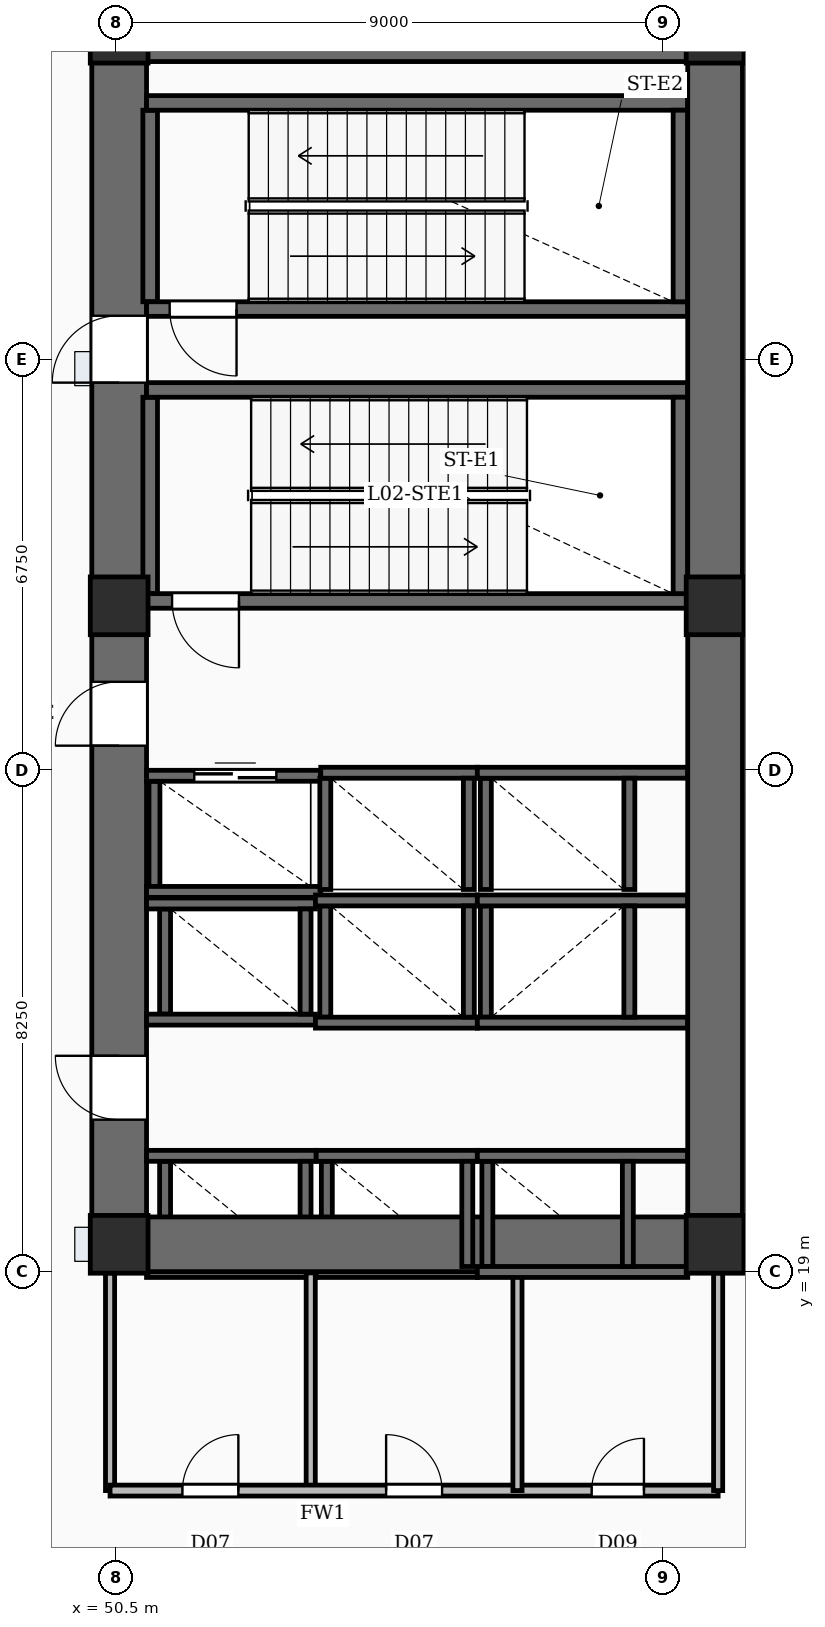
"""IFC4 building model, lengths in metres.
Left out: names, types, materials, properties, quantities, classifications, styles, units other than length and angle.
Written with IfcOpenShell. Run it as: python <this file> out.ifc"""

import sys

from ifc_helpers import new_model, si_unit, direction, frame, frame_2d, origin, origin_2d, place, context, subcontext, project, spatial, rectangle, extrude, element, fill, save


model = new_model("IFC4")
c1 = context("Model", 3, precision=1e-05, world=origin(), true_north=direction((0.0, 1.0)))
c2 = subcontext(c1, "Body", "Model", "MODEL_VIEW")
j1 = project(units=[si_unit("LENGTHUNIT", "METRE"), si_unit("PLANEANGLEUNIT", "RADIAN")], contexts=[c1])
p1 = place(None, origin())
s1 = spatial("IfcSite", under=j1, at=p1, CompositionType="ELEMENT")
p2 = place(p1, origin())
s2 = spatial("IfcBuilding", under=s1, at=p2, CompositionType="ELEMENT")
p3 = place(p2, frame((0.0, 0.0, 13.0)))
s3 = spatial("IfcBuildingStorey", under=s2, at=p3, CompositionType="ELEMENT", Elevation=13.0)
p4 = place(p3, frame((50.55, 19.0, -0.35), z_axis=(0.0, 0.0, 1.0), x_axis=(0.0, 1.0, 0.0)))
e1 = element("IfcWall", 1, at=p4, inside=s3, PredefinedType="SHEAR", context=c2, shape_type="SweptSolid", body=[
    extrude(rectangle(XDim=20.8, YDim=0.9, at=frame_2d((10.4, 0.0))), origin(), (0.0, 0.0, 1.0), 5.0),
])
p5 = place(p4, frame((2.5, 0.0, 0.35)))
e2 = element("IfcOpeningElement", 2, at=p5, cuts=e1, PredefinedType="OPENING", context=c2, shape_type="SweptSolid", body=[
    extrude(rectangle(XDim=1.05, YDim=2.15, at=frame_2d((0.525, 1.075))), frame((0.0, 0.46, 0.0), z_axis=(0.0, -1.0, 0.0), x_axis=(1.0, 0.0, 0.0)), (0.0, 0.0, 1.0), 0.92),
])
p6 = place(p4, frame((8.65, 0.0, 0.35)))
e3 = element("IfcOpeningElement", 3, at=p6, cuts=e1, PredefinedType="OPENING", context=c2, shape_type="SweptSolid", body=[
    extrude(rectangle(XDim=1.05, YDim=2.15, at=frame_2d((0.525, 1.075))), frame((0.0, 0.46, 0.0), z_axis=(0.0, -1.0, 0.0), x_axis=(1.0, 0.0, 0.0)), (0.0, 0.0, 1.0), 0.92),
])
p7 = place(p4, frame((14.62, 0.0, 0.35)))
e4 = element("IfcOpeningElement", 4, at=p7, cuts=e1, PredefinedType="OPENING", context=c2, shape_type="SweptSolid", body=[
    extrude(rectangle(XDim=1.1, YDim=2.15, at=frame_2d((0.55, 1.075))), frame((0.0, 0.46, 0.0), z_axis=(0.0, -1.0, 0.0), x_axis=(1.0, 0.0, 0.0)), (0.0, 0.0, 1.0), 0.92),
])
p8 = place(p3, frame((60.35, 19.0, -0.35), z_axis=(0.0, 0.0, 1.0), x_axis=(0.0, 1.0, 0.0)))
e5 = element("IfcWall", 5, at=p8, inside=s3, PredefinedType="SHEAR", context=c2, shape_type="SweptSolid", body=[
    extrude(rectangle(XDim=20.8, YDim=0.9, at=frame_2d((10.4, 0.0))), origin(), (0.0, 0.0, 1.0), 5.0),
])
for number, where, z_axis, x_axis in (
    (6, (51.0, 19.45, -0.35), (0.0, 0.0, 1.0), (1.0, 0.0, 0.0)),
    (7, (51.0, 39.35, -0.35), (0.0, 0.0, 1.0), (1.0, 0.0, 0.0)),
):
    element("IfcWall", number, at=place(p3, frame(where, z_axis=z_axis, x_axis=x_axis)), inside=s3, PredefinedType="SHEAR", context=c2, shape_type="SweptSolid", body=[
        extrude(rectangle(XDim=8.9, YDim=0.9, at=frame_2d((4.45, 0.0))), origin(), (0.0, 0.0, 1.0), 5.0),
    ])
for number, where, z_axis, x_axis in (
    (8, (50.55, 19.45, -0.35), (0.0, 0.0, 1.0), (1.0, 0.0, 0.0)),
    (9, (60.35, 19.45, -0.35), (0.0, 0.0, 1.0), (1.0, 0.0, 0.0)),
    (10, (50.55, 29.95, -0.35), (0.0, 0.0, 1.0), (1.0, 0.0, 0.0)),
    (11, (60.35, 29.95, -0.35), (0.0, 0.0, 1.0), (1.0, 0.0, 0.0)),
    (12, (50.55, 39.35, -0.35), (0.0, 0.0, 1.0), (1.0, 0.0, 0.0)),
    (13, (60.35, 39.35, -0.35), (0.0, 0.0, 1.0), (1.0, 0.0, 0.0)),
):
    element("IfcColumn", number, at=place(p3, frame(where, z_axis=z_axis, x_axis=x_axis)), inside=s3, PredefinedType="COLUMN", context=c2, shape_type="SweptSolid", body=[
        extrude(rectangle(XDim=0.95, YDim=0.95, at=origin_2d()), origin(), (0.0, 0.0, 1.0), 5.0),
    ])
p9 = place(p3, frame((59.9, 30.03, 0.0), z_axis=(0.0, 0.0, 1.0), x_axis=(-1.0, 0.0, 0.0)))
e14 = element("IfcWall", 14, at=p9, inside=s3, PredefinedType="SOLIDWALL", context=c2, shape_type="SweptSolid", body=[
    extrude(rectangle(XDim=8.9, YDim=0.24, at=frame_2d((4.45, 0.0))), origin(), (0.0, 0.0, 1.0), 4.65),
])
p10 = place(p9, frame((7.38, 0.0, 0.0)))
e15 = element("IfcOpeningElement", 15, at=p10, cuts=e14, PredefinedType="OPENING", context=c2, shape_type="SweptSolid", body=[
    extrude(rectangle(XDim=1.1, YDim=2.15, at=frame_2d((0.55, 1.075))), frame((0.0, 0.13, 0.0), z_axis=(0.0, -1.0, 0.0), x_axis=(1.0, 0.0, 0.0)), (0.0, 0.0, 1.0), 0.26),
])
p11 = place(p3, frame((51.0, 33.5, 0.0), z_axis=(0.0, 0.0, 1.0), x_axis=(1.0, 0.0, 0.0)))
e16 = element("IfcWall", 16, at=p11, inside=s3, PredefinedType="SOLIDWALL", context=c2, shape_type="SweptSolid", body=[
    extrude(rectangle(XDim=8.9, YDim=0.24, at=frame_2d((4.45, 0.0))), origin(), (0.0, 0.0, 1.0), 4.65),
])
for number, where, z_axis, x_axis in (
    (17, (51.06, 30.15, 0.0), (0.0, 0.0, 1.0), (0.0, 1.0, 0.0)),
    (18, (59.78, 30.15, 0.0), (0.0, 0.0, 1.0), (0.0, 1.0, 0.0)),
):
    element("IfcWall", number, at=place(p3, frame(where, z_axis=z_axis, x_axis=x_axis)), inside=s3, PredefinedType="SOLIDWALL", context=c2, shape_type="SweptSolid", body=[
        extrude(rectangle(XDim=3.23, YDim=0.24, at=frame_2d((1.615, 0.0))), origin(), (0.0, 0.0, 1.0), 4.65),
    ])
p12 = place(p3, frame((59.9, 34.83, 0.0), z_axis=(0.0, 0.0, 1.0), x_axis=(-1.0, 0.0, 0.0)))
e19 = element("IfcWall", 19, at=p12, inside=s3, PredefinedType="SOLIDWALL", context=c2, shape_type="SweptSolid", body=[
    extrude(rectangle(XDim=8.9, YDim=0.24, at=frame_2d((4.45, 0.0))), origin(), (0.0, 0.0, 1.0), 4.65),
])
p13 = place(p12, frame((7.42, 0.0, 0.0)))
e20 = element("IfcOpeningElement", 20, at=p13, cuts=e19, PredefinedType="OPENING", context=c2, shape_type="SweptSolid", body=[
    extrude(rectangle(XDim=1.1, YDim=2.15, at=frame_2d((0.55, 1.075))), frame((0.0, 0.13, 0.0), z_axis=(0.0, -1.0, 0.0), x_axis=(1.0, 0.0, 0.0)), (0.0, 0.0, 1.0), 0.26),
])
p14 = place(p3, frame((51.0, 38.22, 0.0), z_axis=(0.0, 0.0, 1.0), x_axis=(1.0, 0.0, 0.0)))
e21 = element("IfcWall", 21, at=p14, inside=s3, PredefinedType="SOLIDWALL", context=c2, shape_type="SweptSolid", body=[
    extrude(rectangle(XDim=8.9, YDim=0.24, at=frame_2d((4.45, 0.0))), origin(), (0.0, 0.0, 1.0), 4.65),
])
for number, where, z_axis, x_axis in (
    (22, (51.06, 34.95, 0.0), (0.0, 0.0, 1.0), (0.0, 1.0, 0.0)),
    (23, (59.78, 34.95, 0.0), (0.0, 0.0, 1.0), (0.0, 1.0, 0.0)),
):
    element("IfcWall", number, at=place(p3, frame(where, z_axis=z_axis, x_axis=x_axis)), inside=s3, PredefinedType="SOLIDWALL", context=c2, shape_type="SweptSolid", body=[
        extrude(rectangle(XDim=3.15, YDim=0.24, at=frame_2d((1.575, 0.0))), origin(), (0.0, 0.0, 1.0), 4.65),
    ])
for number, where, z_axis, x_axis in (
    (24, (51.0, 20.905, 0.0), (0.0, 0.0, 1.0), (1.0, 0.0, 0.0)),
    (25, (51.0, 18.995, 0.0), (0.0, 0.0, 1.0), (1.0, 0.0, 0.0)),
):
    element("IfcWall", number, at=place(p3, frame(where, z_axis=z_axis, x_axis=x_axis)), inside=s3, PredefinedType="SOLIDWALL", context=c2, shape_type="SweptSolid", body=[
        extrude(rectangle(XDim=2.79, YDim=0.18, at=frame_2d((1.395, 0.0))), origin(), (0.0, 0.0, 1.0), 4.65),
    ])
for number, where, z_axis, x_axis in (
    (26, (51.305, 19.085, 0.0), (0.0, 0.0, 1.0), (0.0, 1.0, 0.0)),
    (27, (53.615, 19.085, 0.0), (0.0, 0.0, 1.0), (0.0, 1.0, 0.0)),
):
    element("IfcWall", number, at=place(p3, frame(where, z_axis=z_axis, x_axis=x_axis)), inside=s3, PredefinedType="SOLIDWALL", context=c2, shape_type="SweptSolid", body=[
        extrude(rectangle(XDim=1.73, YDim=0.18, at=frame_2d((0.865, 0.0))), origin(), (0.0, 0.0, 1.0), 4.65),
    ])
for number, where, z_axis, x_axis in (
    (28, (53.79, 20.905, 0.0), (0.0, 0.0, 1.0), (1.0, 0.0, 0.0)),
    (29, (53.79, 18.995, 0.0), (0.0, 0.0, 1.0), (1.0, 0.0, 0.0)),
):
    element("IfcWall", number, at=place(p3, frame(where, z_axis=z_axis, x_axis=x_axis)), inside=s3, PredefinedType="SOLIDWALL", context=c2, shape_type="SweptSolid", body=[
        extrude(rectangle(XDim=2.65, YDim=0.18, at=frame_2d((1.325, 0.0))), origin(), (0.0, 0.0, 1.0), 4.65),
    ])
for number, where, z_axis, x_axis in (
    (30, (53.965, 19.085, 0.0), (0.0, 0.0, 1.0), (0.0, 1.0, 0.0)),
    (31, (56.275, 19.085, 0.0), (0.0, 0.0, 1.0), (0.0, 1.0, 0.0)),
):
    element("IfcWall", number, at=place(p3, frame(where, z_axis=z_axis, x_axis=x_axis)), inside=s3, PredefinedType="SOLIDWALL", context=c2, shape_type="SweptSolid", body=[
        extrude(rectangle(XDim=1.73, YDim=0.18, at=frame_2d((0.865, 0.0))), origin(), (0.0, 0.0, 1.0), 4.65),
    ])
for number, where, z_axis, x_axis in (
    (32, (56.44, 20.905, 0.0), (0.0, 0.0, 1.0), (1.0, 0.0, 0.0)),
    (33, (56.44, 18.995, 0.0), (0.0, 0.0, 1.0), (1.0, 0.0, 0.0)),
):
    element("IfcWall", number, at=place(p3, frame(where, z_axis=z_axis, x_axis=x_axis)), inside=s3, PredefinedType="SOLIDWALL", context=c2, shape_type="SweptSolid", body=[
        extrude(rectangle(XDim=3.46, YDim=0.18, at=frame_2d((1.73, 0.0))), origin(), (0.0, 0.0, 1.0), 4.65),
    ])
for number, where, z_axis, x_axis in (
    (34, (56.605, 19.085, 0.0), (0.0, 0.0, 1.0), (0.0, 1.0, 0.0)),
    (35, (58.915, 19.085, 0.0), (0.0, 0.0, 1.0), (0.0, 1.0, 0.0)),
):
    element("IfcWall", number, at=place(p3, frame(where, z_axis=z_axis, x_axis=x_axis)), inside=s3, PredefinedType="SOLIDWALL", context=c2, shape_type="SweptSolid", body=[
        extrude(rectangle(XDim=1.73, YDim=0.18, at=frame_2d((0.865, 0.0))), origin(), (0.0, 0.0, 1.0), 4.65),
    ])
for number, where, z_axis, x_axis in (
    (36, (51.0, 25.055, 0.0), (0.0, 0.0, 1.0), (1.0, 0.0, 0.0)),
    (37, (51.0, 23.145, 0.0), (0.0, 0.0, 1.0), (1.0, 0.0, 0.0)),
):
    element("IfcWall", number, at=place(p3, frame(where, z_axis=z_axis, x_axis=x_axis)), inside=s3, PredefinedType="SOLIDWALL", context=c2, shape_type="SweptSolid", body=[
        extrude(rectangle(XDim=2.778, YDim=0.18, at=frame_2d((1.389, 0.0))), origin(), (0.0, 0.0, 1.0), 4.65),
    ])
for number, where, z_axis, x_axis in (
    (38, (51.305, 23.235, 0.0), (0.0, 0.0, 1.0), (0.0, 1.0, 0.0)),
    (39, (53.615, 23.235, 0.0), (0.0, 0.0, 1.0), (0.0, 1.0, 0.0)),
):
    element("IfcWall", number, at=place(p3, frame(where, z_axis=z_axis, x_axis=x_axis)), inside=s3, PredefinedType="SOLIDWALL", context=c2, shape_type="SweptSolid", body=[
        extrude(rectangle(XDim=1.73, YDim=0.18, at=frame_2d((0.865, 0.0))), origin(), (0.0, 0.0, 1.0), 4.65),
    ])
for number, where, z_axis, x_axis in (
    (40, (53.778, 25.105, 0.0), (0.0, 0.0, 1.0), (1.0, 0.0, 0.0)),
    (41, (53.778, 23.095, 0.0), (0.0, 0.0, 1.0), (1.0, 0.0, 0.0)),
):
    element("IfcWall", number, at=place(p3, frame(where, z_axis=z_axis, x_axis=x_axis)), inside=s3, PredefinedType="SOLIDWALL", context=c2, shape_type="SweptSolid", body=[
        extrude(rectangle(XDim=2.662, YDim=0.18, at=frame_2d((1.331, 0.0))), origin(), (0.0, 0.0, 1.0), 4.65),
    ])
for number, where, z_axis, x_axis in (
    (42, (53.94, 23.185, 0.0), (0.0, 0.0, 1.0), (0.0, 1.0, 0.0)),
    (43, (56.3, 23.185, 0.0), (0.0, 0.0, 1.0), (0.0, 1.0, 0.0)),
):
    element("IfcWall", number, at=place(p3, frame(where, z_axis=z_axis, x_axis=x_axis)), inside=s3, PredefinedType="SOLIDWALL", context=c2, shape_type="SweptSolid", body=[
        extrude(rectangle(XDim=1.83, YDim=0.18, at=frame_2d((0.915, 0.0))), origin(), (0.0, 0.0, 1.0), 4.65),
    ])
for number, where, z_axis, x_axis in (
    (44, (56.44, 25.105, 0.0), (0.0, 0.0, 1.0), (1.0, 0.0, 0.0)),
    (45, (56.44, 23.095, 0.0), (0.0, 0.0, 1.0), (1.0, 0.0, 0.0)),
):
    element("IfcWall", number, at=place(p3, frame(where, z_axis=z_axis, x_axis=x_axis)), inside=s3, PredefinedType="SOLIDWALL", context=c2, shape_type="SweptSolid", body=[
        extrude(rectangle(XDim=3.46, YDim=0.18, at=frame_2d((1.73, 0.0))), origin(), (0.0, 0.0, 1.0), 4.65),
    ])
for number, where, z_axis, x_axis in (
    (46, (56.58, 23.185, 0.0), (0.0, 0.0, 1.0), (0.0, 1.0, 0.0)),
    (47, (58.94, 23.185, 0.0), (0.0, 0.0, 1.0), (0.0, 1.0, 0.0)),
):
    element("IfcWall", number, at=place(p3, frame(where, z_axis=z_axis, x_axis=x_axis)), inside=s3, PredefinedType="SOLIDWALL", context=c2, shape_type="SweptSolid", body=[
        extrude(rectangle(XDim=1.83, YDim=0.18, at=frame_2d((0.915, 0.0))), origin(), (0.0, 0.0, 1.0), 4.65),
    ])
p15 = place(p3, frame((53.865, 27.205, 0.0), z_axis=(0.0, 0.0, 1.0), x_axis=(1.0, 0.0, 0.0)))
e48 = element("IfcWall", 48, at=p15, inside=s3, PredefinedType="SOLIDWALL", context=c2, shape_type="SweptSolid", body=[
    extrude(rectangle(XDim=2.575, YDim=0.18, at=frame_2d((1.288, 0.0))), origin(), (0.0, 0.0, 1.0), 4.65),
])
for number, where, z_axis, x_axis in (
    (49, (53.94, 25.285, 0.0), (0.0, 0.0, 1.0), (0.0, 1.0, 0.0)),
    (50, (56.3, 25.285, 0.0), (0.0, 0.0, 1.0), (0.0, 1.0, 0.0)),
):
    element("IfcWall", number, at=place(p3, frame(where, z_axis=z_axis, x_axis=x_axis)), inside=s3, PredefinedType="SOLIDWALL", context=c2, shape_type="SweptSolid", body=[
        extrude(rectangle(XDim=1.83, YDim=0.18, at=frame_2d((0.915, 0.0))), origin(), (0.0, 0.0, 1.0), 4.65),
    ])
p16 = place(p3, frame((56.44, 27.205, 0.0), z_axis=(0.0, 0.0, 1.0), x_axis=(1.0, 0.0, 0.0)))
e51 = element("IfcWall", 51, at=p16, inside=s3, PredefinedType="SOLIDWALL", context=c2, shape_type="SweptSolid", body=[
    extrude(rectangle(XDim=3.46, YDim=0.18, at=frame_2d((1.73, 0.0))), origin(), (0.0, 0.0, 1.0), 4.65),
])
for number, where, z_axis, x_axis in (
    (52, (56.58, 25.285, 0.0), (0.0, 0.0, 1.0), (0.0, 1.0, 0.0)),
    (53, (58.94, 25.285, 0.0), (0.0, 0.0, 1.0), (0.0, 1.0, 0.0)),
):
    element("IfcWall", number, at=place(p3, frame(where, z_axis=z_axis, x_axis=x_axis)), inside=s3, PredefinedType="SOLIDWALL", context=c2, shape_type="SweptSolid", body=[
        extrude(rectangle(XDim=1.83, YDim=0.18, at=frame_2d((0.915, 0.0))), origin(), (0.0, 0.0, 1.0), 4.65),
    ])
p17 = place(p3, frame((51.0, 27.155, 0.0), z_axis=(0.0, 0.0, 1.0), x_axis=(1.0, 0.0, 0.0)))
e54 = element("IfcWall", 54, at=p17, inside=s3, PredefinedType="SOLIDWALL", context=c2, shape_type="SweptSolid", body=[
    extrude(rectangle(XDim=2.865, YDim=0.18, at=frame_2d((1.433, 0.0))), origin(), (0.0, 0.0, 1.0), 4.65),
])
p18 = place(p17, frame((0.785, 0.0, 0.0)))
e55 = element("IfcOpeningElement", 55, at=p18, cuts=e54, PredefinedType="OPENING", context=c2, shape_type="SweptSolid", body=[
    extrude(rectangle(XDim=1.35, YDim=2.3, at=frame_2d((0.675, 1.15))), frame((0.0, 0.1, 0.0), z_axis=(0.0, -1.0, 0.0), x_axis=(1.0, 0.0, 0.0)), (0.0, 0.0, 1.0), 0.2),
])
p19 = place(p3, frame((51.0, 25.245, 0.0), z_axis=(0.0, 0.0, 1.0), x_axis=(1.0, 0.0, 0.0)))
e56 = element("IfcWall", 56, at=p19, inside=s3, PredefinedType="SOLIDWALL", context=c2, shape_type="SweptSolid", body=[
    extrude(rectangle(XDim=2.865, YDim=0.18, at=frame_2d((1.433, 0.0))), origin(), (0.0, 0.0, 1.0), 4.65),
])
p20 = place(p3, frame((51.13, 25.335, 0.0), z_axis=(0.0, 0.0, 1.0), x_axis=(0.0, 1.0, 0.0)))
e57 = element("IfcWall", 57, at=p20, inside=s3, PredefinedType="SOLIDWALL", context=c2, shape_type="SweptSolid", body=[
    extrude(rectangle(XDim=1.73, YDim=0.18, at=frame_2d((0.865, 0.0))), origin(), (0.0, 0.0, 1.0), 4.65),
])
for number, where, z_axis, x_axis in (
    (58, (53.7, 15.4, 0.0), (0.0, 0.0, 1.0), (0.0, 1.0, 0.0)),
    (59, (57.1, 15.4, 0.0), (0.0, 0.0, 1.0), (0.0, 1.0, 0.0)),
):
    element("IfcWall", number, at=place(p3, frame(where, z_axis=z_axis, x_axis=x_axis)), inside=s3, PredefinedType="PARTITIONING", context=c2, shape_type="SweptSolid", body=[
        extrude(rectangle(XDim=3.58, YDim=0.15, at=frame_2d((1.79, 0.0))), origin(), (0.0, 0.0, 1.0), 3.71),
    ])
p21 = place(p3, frame((50.4, 15.4, 0.0), z_axis=(0.0, 0.0, 1.0), x_axis=(1.0, 0.0, 0.0)))
e60 = element("IfcWall", 60, at=p21, inside=s3, PredefinedType="SOLIDWALL", context=c2, shape_type="SweptSolid", body=[
    extrude(rectangle(XDim=10.0, YDim=0.18, at=frame_2d((5.0, 0.0))), origin(), (0.0, 0.0, 1.0), 3.71),
])
p22 = place(p21, frame((1.19, 0.0, 0.0)))
e61 = element("IfcOpeningElement", 61, at=p22, cuts=e60, PredefinedType="OPENING", context=c2, shape_type="SweptSolid", body=[
    extrude(rectangle(XDim=0.92, YDim=2.1, at=frame_2d((0.46, 1.05))), frame((0.0, 0.1, 0.0), z_axis=(0.0, -1.0, 0.0), x_axis=(1.0, 0.0, 0.0)), (0.0, 0.0, 1.0), 0.2),
])
p23 = place(p21, frame((4.54, 0.0, 0.0)))
e62 = element("IfcOpeningElement", 62, at=p23, cuts=e60, PredefinedType="OPENING", context=c2, shape_type="SweptSolid", body=[
    extrude(rectangle(XDim=0.92, YDim=2.1, at=frame_2d((0.46, 1.05))), frame((0.0, 0.1, 0.0), z_axis=(0.0, -1.0, 0.0), x_axis=(1.0, 0.0, 0.0)), (0.0, 0.0, 1.0), 0.2),
])
p24 = place(p21, frame((7.92, 0.0, 0.0)))
e63 = element("IfcOpeningElement", 63, at=p24, cuts=e60, PredefinedType="OPENING", context=c2, shape_type="SweptSolid", body=[
    extrude(rectangle(XDim=0.86, YDim=2.05, at=frame_2d((0.43, 1.025))), frame((0.0, 0.1, 0.0), z_axis=(0.0, -1.0, 0.0), x_axis=(1.0, 0.0, 0.0)), (0.0, 0.0, 1.0), 0.2),
])
for number, where, z_axis, x_axis in (
    (64, (50.4, 15.4, 0.0), (0.0, 0.0, 1.0), (0.0, 1.0, 0.0)),
    (65, (60.4, 15.4, 0.0), (0.0, 0.0, 1.0), (0.0, 1.0, 0.0)),
):
    element("IfcWall", number, at=place(p3, frame(where, z_axis=z_axis, x_axis=x_axis)), inside=s3, PredefinedType="PARTITIONING", context=c2, shape_type="SweptSolid", body=[
        extrude(rectangle(XDim=3.58, YDim=0.15, at=frame_2d((1.79, 0.0))), origin(), (0.0, 0.0, 1.0), 3.71),
    ])
p25 = place(p5, origin())
e66 = element("IfcDoor", 66, at=p25, inside=s3, OperationType="SINGLE_SWING_RIGHT", PredefinedType="DOOR", context=c2, shape_type="SweptSolid", body=[
    extrude(rectangle(XDim=1.05, YDim=2.15, at=frame_2d((0.525, 1.075))), frame((0.0, 0.025, 0.0), z_axis=(0.0, -1.0, 0.0), x_axis=(1.0, 0.0, 0.0)), (0.0, 0.0, 1.0), 0.05),
])
fill(e2, e66)
p26 = place(p6, origin())
e67 = element("IfcDoor", 67, at=p26, inside=s3, OperationType="SINGLE_SWING_LEFT", PredefinedType="DOOR", context=c2, shape_type="SweptSolid", body=[
    extrude(rectangle(XDim=1.05, YDim=2.15, at=frame_2d((0.525, 1.075))), frame((0.0, 0.025, 0.0), z_axis=(0.0, -1.0, 0.0), x_axis=(1.0, 0.0, 0.0)), (0.0, 0.0, 1.0), 0.05),
])
fill(e3, e67)
p27 = place(p7, origin())
e68 = element("IfcDoor", 68, at=p27, inside=s3, OperationType="SINGLE_SWING_LEFT", PredefinedType="DOOR", context=c2, shape_type="SweptSolid", body=[
    extrude(rectangle(XDim=1.1, YDim=2.15, at=frame_2d((0.55, 1.075))), frame((0.0, 0.025, 0.0), z_axis=(0.0, -1.0, 0.0), x_axis=(1.0, 0.0, 0.0)), (0.0, 0.0, 1.0), 0.05),
])
fill(e4, e68)
p28 = place(p10, origin())
e69 = element("IfcDoor", 69, at=p28, inside=s3, OperationType="SINGLE_SWING_LEFT", PredefinedType="DOOR", context=c2, shape_type="SweptSolid", body=[
    extrude(rectangle(XDim=1.1, YDim=2.15, at=frame_2d((0.55, 1.075))), frame((0.0, 0.025, 0.0), z_axis=(0.0, -1.0, 0.0), x_axis=(1.0, 0.0, 0.0)), (0.0, 0.0, 1.0), 0.05),
])
fill(e15, e69)
p29 = place(p13, origin())
e70 = element("IfcDoor", 70, at=p29, inside=s3, OperationType="SINGLE_SWING_LEFT", PredefinedType="DOOR", context=c2, shape_type="SweptSolid", body=[
    extrude(rectangle(XDim=1.1, YDim=2.15, at=frame_2d((0.55, 1.075))), frame((0.0, 0.025, 0.0), z_axis=(0.0, -1.0, 0.0), x_axis=(1.0, 0.0, 0.0)), (0.0, 0.0, 1.0), 0.05),
])
fill(e20, e70)
p30 = place(p18, origin())
e71 = element("IfcDoor", 71, at=p30, inside=s3, OperationType="DOUBLE_DOOR_SLIDING", PredefinedType="DOOR", context=c2, shape_type="SweptSolid", body=[
    extrude(rectangle(XDim=1.35, YDim=2.3, at=frame_2d((0.675, 1.15))), frame((0.0, 0.025, 0.0), z_axis=(0.0, -1.0, 0.0), x_axis=(1.0, 0.0, 0.0)), (0.0, 0.0, 1.0), 0.05),
])
fill(e55, e71)
p31 = place(p22, origin())
e72 = element("IfcDoor", 72, at=p31, inside=s3, OperationType="SINGLE_SWING_RIGHT", PredefinedType="DOOR", context=c2, shape_type="SweptSolid", body=[
    extrude(rectangle(XDim=0.92, YDim=2.1, at=frame_2d((0.46, 1.05))), frame((0.0, 0.025, 0.0), z_axis=(0.0, -1.0, 0.0), x_axis=(1.0, 0.0, 0.0)), (0.0, 0.0, 1.0), 0.05),
])
fill(e61, e72)
p32 = place(p23, origin())
e73 = element("IfcDoor", 73, at=p32, inside=s3, OperationType="SINGLE_SWING_LEFT", PredefinedType="DOOR", context=c2, shape_type="SweptSolid", body=[
    extrude(rectangle(XDim=0.92, YDim=2.1, at=frame_2d((0.46, 1.05))), frame((0.0, 0.025, 0.0), z_axis=(0.0, -1.0, 0.0), x_axis=(1.0, 0.0, 0.0)), (0.0, 0.0, 1.0), 0.05),
])
fill(e62, e73)
p33 = place(p24, origin())
e74 = element("IfcDoor", 74, at=p33, inside=s3, OperationType="SINGLE_SWING_RIGHT", PredefinedType="DOOR", context=c2, shape_type="SweptSolid", body=[
    extrude(rectangle(XDim=0.86, YDim=2.05, at=frame_2d((0.43, 1.025))), frame((0.0, 0.025, 0.0), z_axis=(0.0, -1.0, 0.0), x_axis=(1.0, 0.0, 0.0)), (0.0, 0.0, 1.0), 0.05),
])
fill(e63, e74)
save(model, sys.argv[1])
